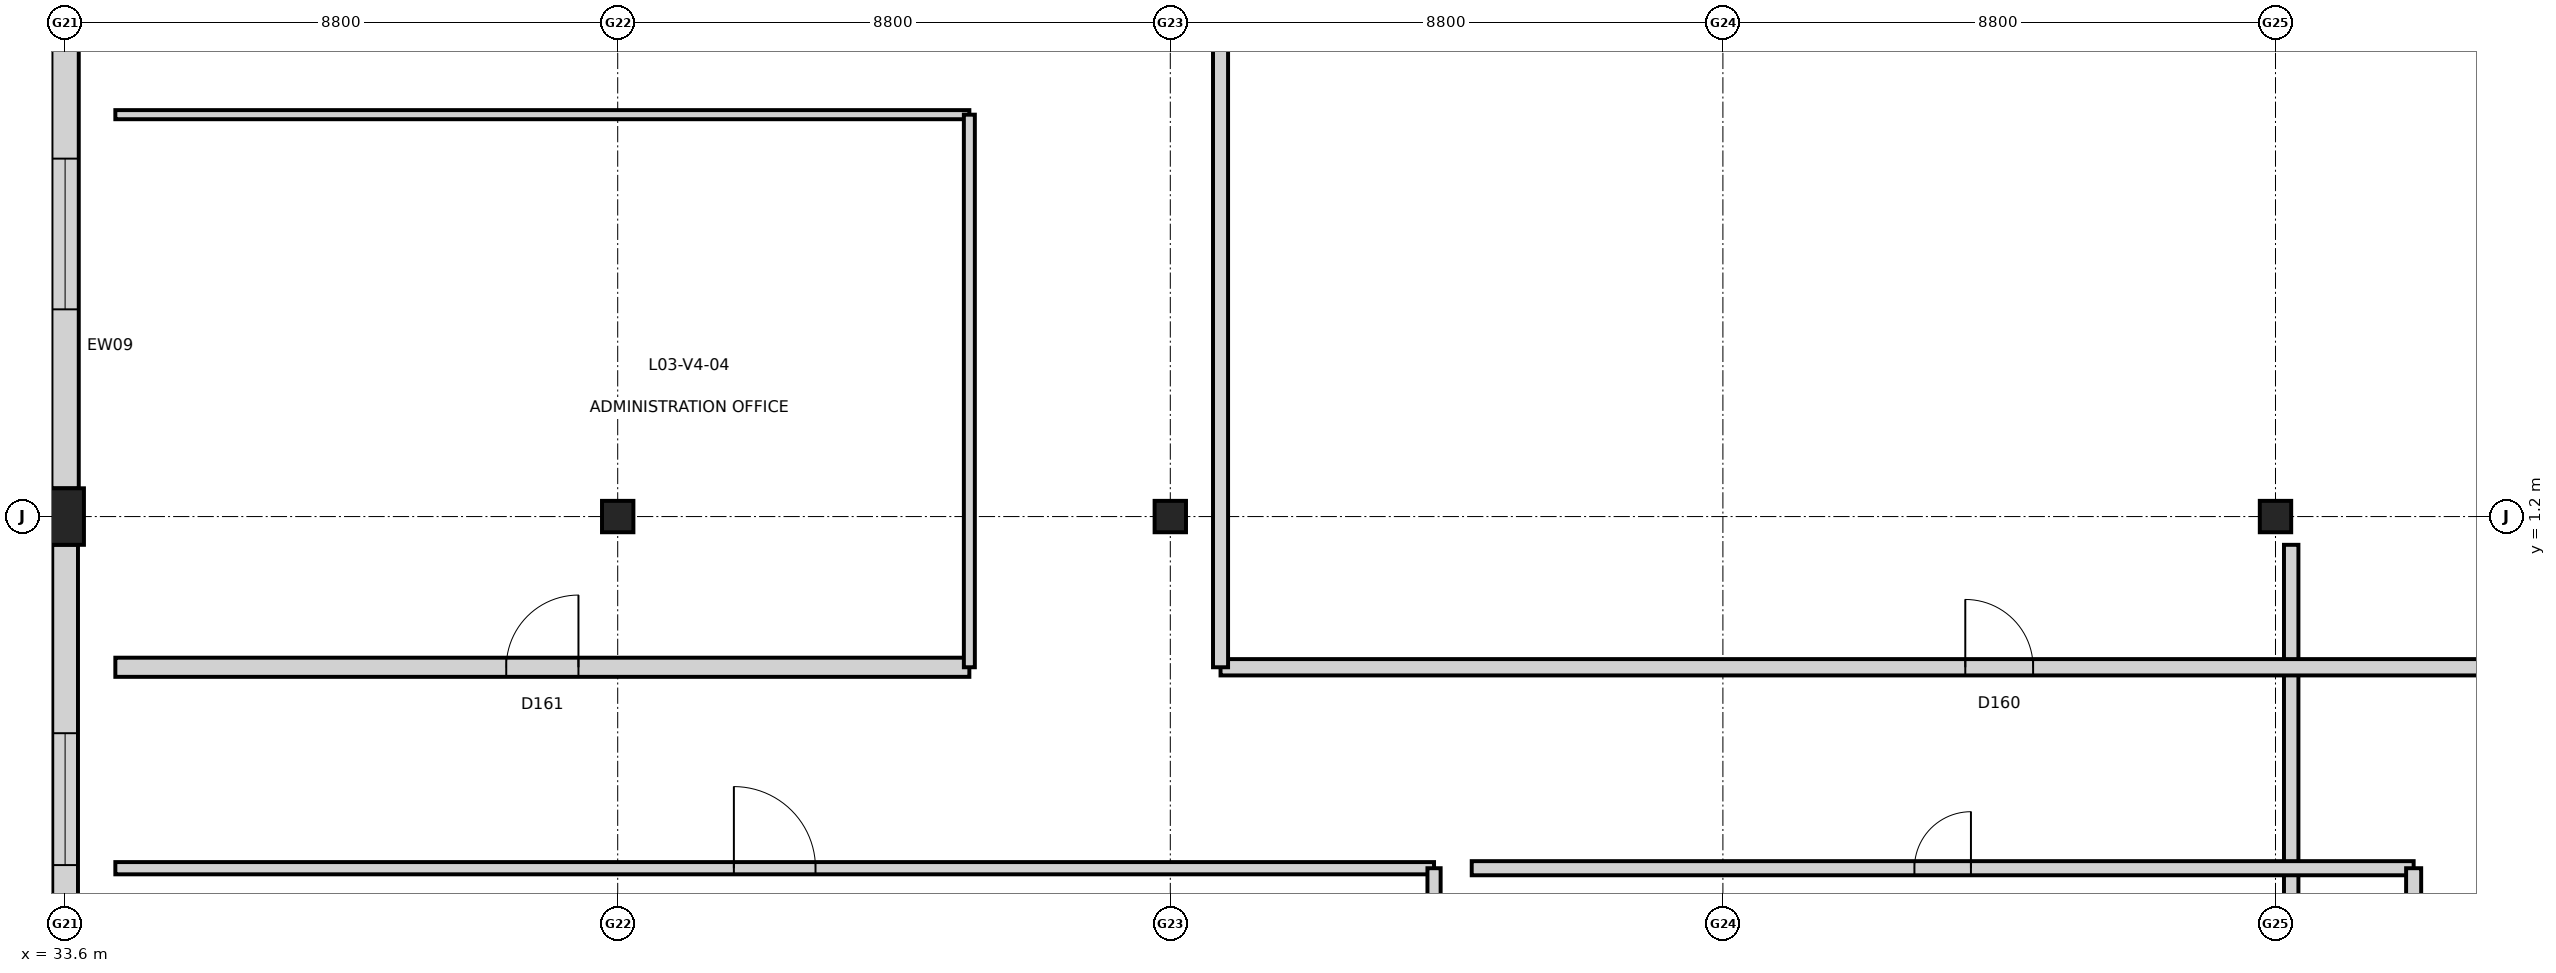
"""IFC4 building model, lengths in metres.
Left out: names, types, materials, properties, quantities, classifications, styles, units other than length and angle.
Written with IfcOpenShell. Run it as: python <this file> out.ifc"""

import sys

from ifc_helpers import new_model, si_unit, direction, frame, frame_2d, origin, origin_2d, place, context, subcontext, project, spatial, rectangle, extrude, element, fill, save


model = new_model("IFC4")
c1 = context("Model", 3, precision=1e-05, world=origin(), true_north=direction((0.0, 1.0)))
c2 = subcontext(c1, "Body", "Model", "MODEL_VIEW")
j1 = project(units=[si_unit("LENGTHUNIT", "METRE"), si_unit("PLANEANGLEUNIT", "RADIAN")], contexts=[c1])
p1 = place(None, origin())
s1 = spatial("IfcSite", under=j1, at=p1, CompositionType="ELEMENT")
p2 = place(p1, origin())
s2 = spatial("IfcBuilding", under=s1, at=p2, CompositionType="ELEMENT")
p3 = place(p2, frame((0.0, 0.0, 15.0)))
s3 = spatial("IfcBuildingStorey", under=s2, at=p3, CompositionType="ELEMENT", Elevation=15.0)
p4 = place(p3, frame((33.6, 1.2, 0.0), z_axis=(0.0, 0.0, 1.0), x_axis=(1.0, 0.0, 0.0)))
e1 = element("IfcColumn", 1, at=p4, inside=s3, PredefinedType="COLUMN", context=c2, shape_type="SweptSolid", body=[
    extrude(rectangle(XDim=0.6, YDim=0.9, at=origin_2d()), origin(), (0.0, 0.0, 1.0), 4.8),
])
for number, where, z_axis, x_axis in (
    (2, (42.4, 1.2, 0.0), (0.0, 0.0, 1.0), (1.0, 0.0, 0.0)),
    (3, (51.2, 1.2, 0.0), (0.0, 0.0, 1.0), (1.0, 0.0, 0.0)),
    (4, (68.8, 1.2, 0.0), (0.0, 0.0, 1.0), (1.0, 0.0, 0.0)),
):
    element("IfcColumn", number, at=place(p3, frame(where, z_axis=z_axis, x_axis=x_axis)), inside=s3, PredefinedType="COLUMN", context=c2, shape_type="SweptSolid", body=[
        extrude(rectangle(XDim=0.5, YDim=0.5, at=origin_2d()), origin(), (0.0, 0.0, 1.0), 4.8),
    ])
p5 = place(p3, frame((33.6, -7.352, 0.0), z_axis=(0.0, 0.0, 1.0), x_axis=(0.0, 1.0, 0.0)))
e5 = element("IfcWall", 5, at=p5, inside=s3, PredefinedType="STANDARD", context=c2, shape_type="SweptSolid", body=[
    extrude(rectangle(XDim=8.104, YDim=0.41, at=frame_2d((4.052, 0.0))), origin(), (0.0, 0.0, 1.0), 3.744),
])
p6 = place(p5, frame((3.002, 0.0, 0.6)))
e6 = element("IfcOpeningElement", 6, at=p6, cuts=e5, PredefinedType="OPENING", context=c2, shape_type="SweptSolid", body=[
    extrude(rectangle(XDim=2.1, YDim=2.35, at=frame_2d((1.05, 1.175))), frame((0.0, 0.215, 0.0), z_axis=(0.0, -1.0, 0.0), x_axis=(1.0, 0.0, 0.0)), (0.0, 0.0, 1.0), 0.43),
])
p7 = place(p3, frame((33.6, 1.648, 0.0), z_axis=(0.0, 0.0, 1.0), x_axis=(0.0, 1.0, 0.0)))
e7 = element("IfcWall", 7, at=p7, inside=s3, PredefinedType="STANDARD", context=c2, shape_type="SweptSolid", body=[
    extrude(rectangle(XDim=8.104, YDim=0.435, at=frame_2d((4.052, 0.0))), origin(), (0.0, 0.0, 1.0), 3.829),
])
p8 = place(p7, frame((2.852, 0.0, 0.6)))
e8 = element("IfcOpeningElement", 8, at=p8, cuts=e7, PredefinedType="OPENING", context=c2, shape_type="SweptSolid", body=[
    extrude(rectangle(XDim=2.4, YDim=2.35, at=frame_2d((1.2, 1.175))), frame((0.0, 0.228, 0.0), z_axis=(0.0, -1.0, 0.0), x_axis=(1.0, 0.0, 0.0)), (0.0, 0.0, 1.0), 0.455),
])
p9 = place(p3, frame((69.05, 0.75, 4.8), z_axis=(0.0, 0.0, 1.0), x_axis=(0.0, -1.0, 0.0)))
e9 = element("IfcWall", 9, at=p9, inside=s3, PredefinedType="PARAPET", context=c2, shape_type="SweptSolid", body=[
    extrude(rectangle(XDim=20.1, YDim=0.23, at=frame_2d((10.05, 0.0))), origin(), (0.0, 0.0, 1.0), 1.15),
])
p10 = place(p3, frame((34.4, -4.4, 0.0), z_axis=(0.0, 0.0, 1.0), x_axis=(1.0, 0.0, 0.0)))
e10 = element("IfcWall", 10, at=p10, inside=s3, PredefinedType="PARTITIONING", context=c2, shape_type="SweptSolid", body=[
    extrude(rectangle(XDim=21.0, YDim=0.195, at=frame_2d((10.5, 0.0))), origin(), (0.0, 0.0, 1.0), 4.42),
])
p11 = place(p10, frame((9.85, 0.0, 0.0)))
e11 = element("IfcOpeningElement", 11, at=p11, cuts=e10, PredefinedType="OPENING", context=c2, shape_type="SweptSolid", body=[
    extrude(rectangle(XDim=1.3, YDim=2.25, at=frame_2d((0.65, 1.125))), frame((0.0, 0.107, 0.0), z_axis=(0.0, -1.0, 0.0), x_axis=(1.0, 0.0, 0.0)), (0.0, 0.0, 1.0), 0.215),
])
p12 = place(p3, frame((55.4, -19.0, 0.0), z_axis=(0.0, 0.0, 1.0), x_axis=(0.0, 1.0, 0.0)))
e12 = element("IfcWall", 12, at=p12, inside=s3, PredefinedType="PARTITIONING", context=c2, shape_type="SweptSolid", body=[
    extrude(rectangle(XDim=14.6, YDim=0.21, at=frame_2d((7.3, 0.0))), origin(), (0.0, 0.0, 1.0), 4.42),
])
p13 = place(p3, frame((56.0, -4.4, 0.0), z_axis=(0.0, 0.0, 1.0), x_axis=(1.0, 0.0, 0.0)))
e13 = element("IfcWall", 13, at=p13, inside=s3, PredefinedType="PARTITIONING", context=c2, shape_type="SweptSolid", body=[
    extrude(rectangle(XDim=15.0, YDim=0.225, at=frame_2d((7.5, 0.0))), origin(), (0.0, 0.0, 1.0), 4.42),
])
p14 = place(p13, frame((7.05, 0.0, 0.0)))
e14 = element("IfcOpeningElement", 14, at=p14, cuts=e13, PredefinedType="OPENING", context=c2, shape_type="SweptSolid", body=[
    extrude(rectangle(XDim=0.9, YDim=2.1, at=frame_2d((0.45, 1.05))), frame((0.0, 0.123, 0.0), z_axis=(0.0, -1.0, 0.0), x_axis=(1.0, 0.0, 0.0)), (0.0, 0.0, 1.0), 0.245),
])
p15 = place(p3, frame((71.0, -19.0, 0.0), z_axis=(0.0, 0.0, 1.0), x_axis=(0.0, 1.0, 0.0)))
e15 = element("IfcWall", 15, at=p15, inside=s3, PredefinedType="PARTITIONING", context=c2, shape_type="SweptSolid", body=[
    extrude(rectangle(XDim=14.6, YDim=0.24, at=frame_2d((7.3, 0.0))), origin(), (0.0, 0.0, 1.0), 4.42),
])
p16 = place(p3, frame((52.0, -1.2, 0.0), z_axis=(0.0, 0.0, 1.0), x_axis=(1.0, 0.0, 0.0)))
e16 = element("IfcWall", 16, at=p16, inside=s3, PredefinedType="PARTITIONING", context=c2, shape_type="SweptSolid", body=[
    extrude(rectangle(XDim=24.8, YDim=0.26, at=frame_2d((12.4, 0.0))), origin(), (0.0, 0.0, 1.0), 4.42),
])
p17 = place(p16, frame((11.86, 0.0, 0.0)))
e17 = element("IfcOpeningElement", 17, at=p17, cuts=e16, PredefinedType="OPENING", context=c2, shape_type="SweptSolid", body=[
    extrude(rectangle(XDim=1.08, YDim=2.25, at=frame_2d((0.54, 1.125))), frame((0.0, 0.14, 0.0), z_axis=(0.0, -1.0, 0.0), x_axis=(1.0, 0.0, 0.0)), (0.0, 0.0, 1.0), 0.28),
])
p18 = place(p3, frame((52.0, -1.2, 0.0), z_axis=(0.0, 0.0, 1.0), x_axis=(0.0, 1.0, 0.0)))
e18 = element("IfcWall", 18, at=p18, inside=s3, PredefinedType="PARTITIONING", context=c2, shape_type="SweptSolid", body=[
    extrude(rectangle(XDim=25.6, YDim=0.24, at=frame_2d((12.8, 0.0))), origin(), (0.0, 0.0, 1.0), 4.42),
])
p19 = place(p3, frame((34.4, -1.2, 0.0), z_axis=(0.0, 0.0, 1.0), x_axis=(1.0, 0.0, 0.0)))
e19 = element("IfcWall", 19, at=p19, inside=s3, PredefinedType="PARTITIONING", context=c2, shape_type="SweptSolid", body=[
    extrude(rectangle(XDim=13.6, YDim=0.305, at=frame_2d((6.8, 0.0))), origin(), (0.0, 0.0, 1.0), 4.42),
])
p20 = place(p19, frame((6.225, 0.0, 0.0)))
e20 = element("IfcOpeningElement", 20, at=p20, cuts=e19, PredefinedType="OPENING", context=c2, shape_type="SweptSolid", body=[
    extrude(rectangle(XDim=1.15, YDim=2.3, at=frame_2d((0.575, 1.15))), frame((0.0, 0.162, 0.0), z_axis=(0.0, -1.0, 0.0), x_axis=(1.0, 0.0, 0.0)), (0.0, 0.0, 1.0), 0.325),
])
p21 = place(p3, frame((34.4, 7.6, 0.0), z_axis=(0.0, 0.0, 1.0), x_axis=(1.0, 0.0, 0.0)))
e21 = element("IfcWall", 21, at=p21, inside=s3, PredefinedType="PARTITIONING", context=c2, shape_type="SweptSolid", body=[
    extrude(rectangle(XDim=13.6, YDim=0.145, at=frame_2d((6.8, 0.0))), origin(), (0.0, 0.0, 1.0), 4.42),
])
p22 = place(p3, frame((48.0, -1.2, 0.0), z_axis=(0.0, 0.0, 1.0), x_axis=(0.0, 1.0, 0.0)))
e22 = element("IfcWall", 22, at=p22, inside=s3, PredefinedType="PARTITIONING", context=c2, shape_type="SweptSolid", body=[
    extrude(rectangle(XDim=8.8, YDim=0.175, at=frame_2d((4.4, 0.0))), origin(), (0.0, 0.0, 1.0), 4.047),
])
p23 = place(p6, origin())
e23 = element("IfcWindow", 23, at=p23, inside=s3, PartitioningType="SINGLE_PANEL", PredefinedType="WINDOW", context=c2, shape_type="SweptSolid", body=[
    extrude(rectangle(XDim=2.1, YDim=2.35, at=frame_2d((1.05, 1.175))), frame((0.0, 0.03, 0.0), z_axis=(0.0, -1.0, 0.0), x_axis=(1.0, 0.0, 0.0)), (0.0, 0.0, 1.0), 0.06),
])
fill(e6, e23)
p24 = place(p8, origin())
e24 = element("IfcWindow", 24, at=p24, inside=s3, PartitioningType="SINGLE_PANEL", PredefinedType="WINDOW", context=c2, shape_type="SweptSolid", body=[
    extrude(rectangle(XDim=2.4, YDim=2.35, at=frame_2d((1.2, 1.175))), frame((0.0, 0.03, 0.0), z_axis=(0.0, -1.0, 0.0), x_axis=(1.0, 0.0, 0.0)), (0.0, 0.0, 1.0), 0.06),
])
fill(e8, e24)
p25 = place(p2, frame((0.0, 0.0, 41.4)))
p26 = place(p25, frame((0.0, 0.0, -21.875)))
p27 = place(p26, frame((71.733, 2.7, 0.0)))
p28 = place(p27, frame((0.0, 0.0, 0.225)))
e25 = element("IfcWindow", 25, at=p28, inside=s3, PartitioningType="SINGLE_PANEL", PredefinedType="SKYLIGHT", context=c2, shape_type="SweptSolid", body=[
    extrude(rectangle(XDim=1.3, YDim=1.3, at=origin_2d()), origin(), (0.0, 0.0, 1.0), 0.05),
])
p29 = place(p11, origin())
e26 = element("IfcDoor", 26, at=p29, inside=s3, OperationType="SINGLE_SWING_LEFT", PredefinedType="DOOR", context=c2, shape_type="SweptSolid", body=[
    extrude(rectangle(XDim=1.3, YDim=2.25, at=frame_2d((0.65, 1.125))), frame((0.0, 0.025, 0.0), z_axis=(0.0, -1.0, 0.0), x_axis=(1.0, 0.0, 0.0)), (0.0, 0.0, 1.0), 0.05),
])
fill(e11, e26)
p30 = place(p14, origin())
e27 = element("IfcDoor", 27, at=p30, inside=s3, OperationType="SINGLE_SWING_RIGHT", PredefinedType="DOOR", context=c2, shape_type="SweptSolid", body=[
    extrude(rectangle(XDim=0.9, YDim=2.1, at=frame_2d((0.45, 1.05))), frame((0.0, 0.025, 0.0), z_axis=(0.0, -1.0, 0.0), x_axis=(1.0, 0.0, 0.0)), (0.0, 0.0, 1.0), 0.05),
])
fill(e14, e27)
p31 = place(p17, origin())
e28 = element("IfcDoor", 28, at=p31, inside=s3, OperationType="SINGLE_SWING_LEFT", PredefinedType="DOOR", context=c2, shape_type="SweptSolid", body=[
    extrude(rectangle(XDim=1.08, YDim=2.25, at=frame_2d((0.54, 1.125))), frame((0.0, 0.025, 0.0), z_axis=(0.0, -1.0, 0.0), x_axis=(1.0, 0.0, 0.0)), (0.0, 0.0, 1.0), 0.05),
])
fill(e17, e28)
p32 = place(p20, origin())
e29 = element("IfcDoor", 29, at=p32, inside=s3, OperationType="SINGLE_SWING_RIGHT", PredefinedType="DOOR", context=c2, shape_type="SweptSolid", body=[
    extrude(rectangle(XDim=1.15, YDim=2.3, at=frame_2d((0.575, 1.15))), frame((0.0, 0.025, 0.0), z_axis=(0.0, -1.0, 0.0), x_axis=(1.0, 0.0, 0.0)), (0.0, 0.0, 1.0), 0.05),
])
fill(e20, e29)
save(model, sys.argv[1])
